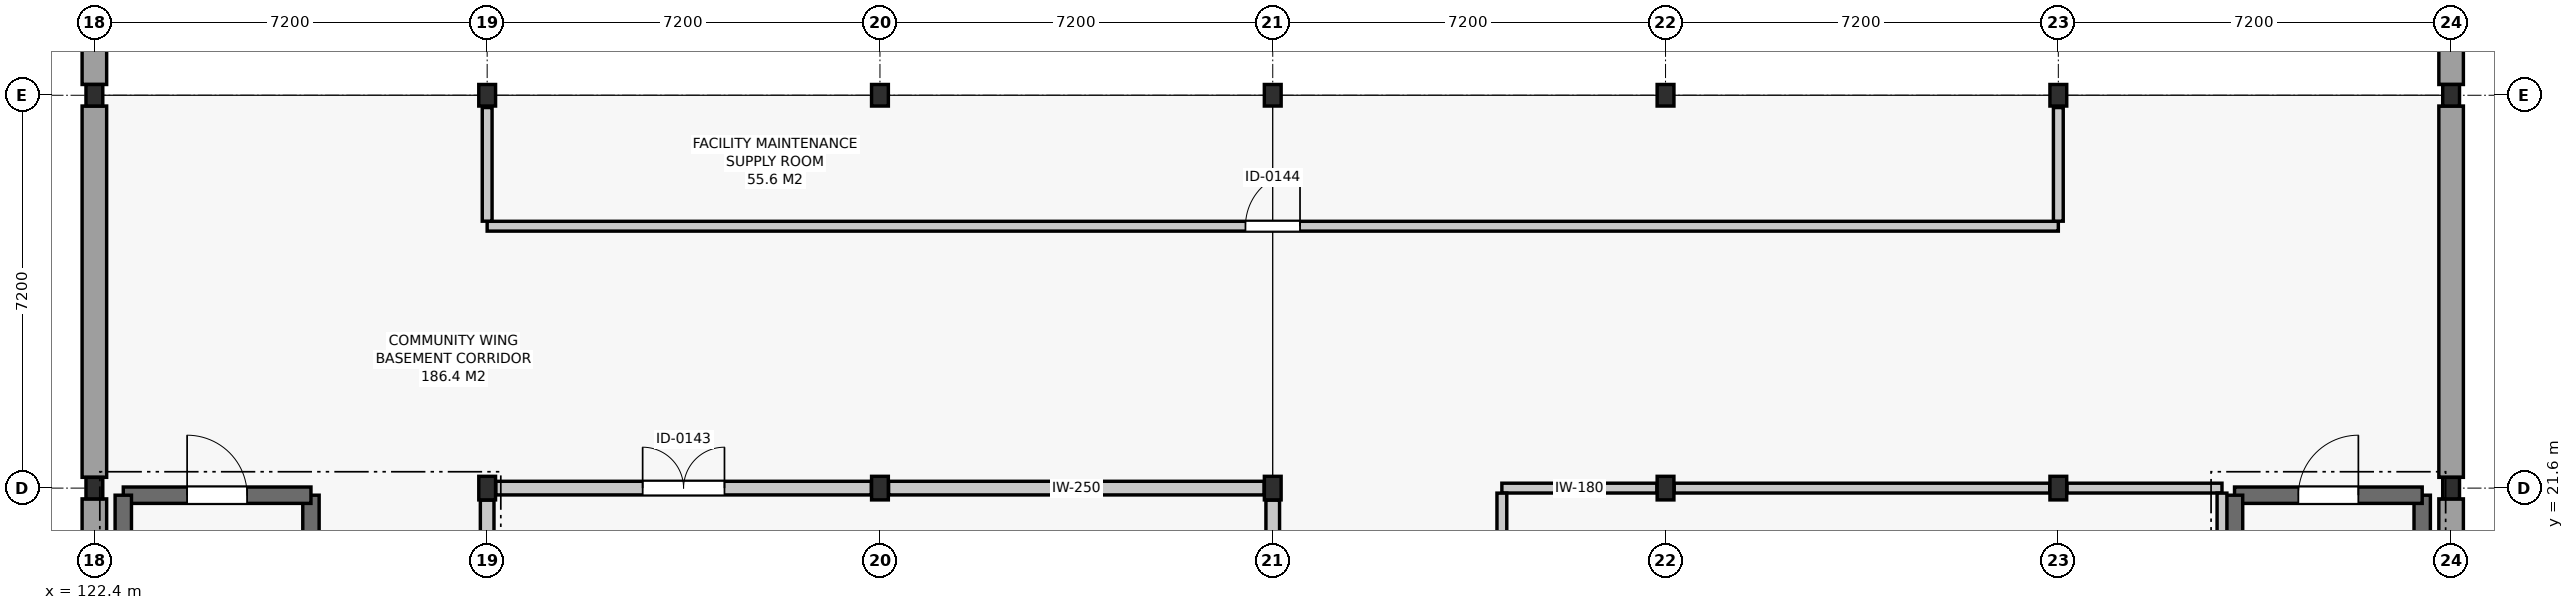
"""IFC4 building model, lengths in metres.
Left out: names, types, materials, properties, quantities, classifications, styles, units other than length and angle.
Written with IfcOpenShell. Run it as: python <this file> out.ifc"""

import sys

from ifc_helpers import new_model, si_unit, direction, frame, frame_2d, origin, origin_2d, place, context, subcontext, project, spatial, rectangle, i_section, extrude, element, fill, save


model = new_model("IFC4")
c1 = context("Model", 3, precision=1e-05, world=origin(), true_north=direction((0.0, 1.0)))
c2 = subcontext(c1, "Body", "Model", "MODEL_VIEW")
j1 = project(units=[si_unit("LENGTHUNIT", "METRE"), si_unit("PLANEANGLEUNIT", "RADIAN")], contexts=[c1])
p1 = place(None, origin())
s1 = spatial("IfcSite", under=j1, at=p1, CompositionType="ELEMENT")
p2 = place(p1, origin())
s2 = spatial("IfcBuilding", under=s1, at=p2, CompositionType="ELEMENT")
p3 = place(p2, frame((0.0, 0.0, -4.2)))
s3 = spatial("IfcBuildingStorey", under=s2, at=p3, CompositionType="ELEMENT", Elevation=-4.2)
for number, where, z_axis, x_axis in (
    (1, (122.4, 21.6, 0.0), (0.0, 0.0, 1.0), (1.0, 0.0, 0.0)),
    (2, (122.4, 28.8, 0.0), (0.0, 0.0, 1.0), (1.0, 0.0, 0.0)),
):
    element("IfcColumn", number, at=place(p3, frame(where, z_axis=z_axis, x_axis=x_axis)), inside=s3, PredefinedType="COLUMN", context=c2, shape_type="SweptSolid", body=[
        extrude(i_section(OverallWidth=0.308, OverallDepth=0.395, WebThickness=0.021, FlangeThickness=0.036, FilletRadius=0.027, at=origin_2d()), origin(), (0.0, 0.0, 1.0), 4.2),
    ])
p4 = place(p3, frame((129.6, 21.6, 0.0), z_axis=(0.0, 0.0, 1.0), x_axis=(1.0, 0.0, 0.0)))
e3 = element("IfcColumn", 3, at=p4, inside=s3, PredefinedType="COLUMN", context=c2, shape_type="SweptSolid", body=[
    extrude(i_section(OverallWidth=0.307, OverallDepth=0.432, WebThickness=0.021, FlangeThickness=0.04, FilletRadius=0.027, at=origin_2d()), origin(), (0.0, 0.0, 1.0), 4.2),
])
p5 = place(p3, frame((129.6, 28.8, 0.0), z_axis=(0.0, 0.0, 1.0), x_axis=(1.0, 0.0, 0.0)))
e4 = element("IfcColumn", 4, at=p5, inside=s3, PredefinedType="COLUMN", context=c2, shape_type="SweptSolid", body=[
    extrude(i_section(OverallWidth=0.308, OverallDepth=0.395, WebThickness=0.021, FlangeThickness=0.036, FilletRadius=0.027, at=origin_2d()), origin(), (0.0, 0.0, 1.0), 4.2),
])
p6 = place(p3, frame((136.8, 21.6, 0.0), z_axis=(0.0, 0.0, 1.0), x_axis=(1.0, 0.0, 0.0)))
e5 = element("IfcColumn", 5, at=p6, inside=s3, PredefinedType="COLUMN", context=c2, shape_type="SweptSolid", body=[
    extrude(i_section(OverallWidth=0.307, OverallDepth=0.432, WebThickness=0.021, FlangeThickness=0.04, FilletRadius=0.027, at=origin_2d()), origin(), (0.0, 0.0, 1.0), 4.2),
])
p7 = place(p3, frame((136.8, 28.8, 0.0), z_axis=(0.0, 0.0, 1.0), x_axis=(1.0, 0.0, 0.0)))
e6 = element("IfcColumn", 6, at=p7, inside=s3, PredefinedType="COLUMN", context=c2, shape_type="SweptSolid", body=[
    extrude(i_section(OverallWidth=0.308, OverallDepth=0.395, WebThickness=0.021, FlangeThickness=0.036, FilletRadius=0.027, at=origin_2d()), origin(), (0.0, 0.0, 1.0), 4.2),
])
p8 = place(p3, frame((144.0, 21.6, 0.0), z_axis=(0.0, 0.0, 1.0), x_axis=(1.0, 0.0, 0.0)))
e7 = element("IfcColumn", 7, at=p8, inside=s3, PredefinedType="COLUMN", context=c2, shape_type="SweptSolid", body=[
    extrude(i_section(OverallWidth=0.307, OverallDepth=0.432, WebThickness=0.021, FlangeThickness=0.04, FilletRadius=0.027, at=origin_2d()), origin(), (0.0, 0.0, 1.0), 4.2),
])
p9 = place(p3, frame((144.0, 28.8, 0.0), z_axis=(0.0, 0.0, 1.0), x_axis=(1.0, 0.0, 0.0)))
e8 = element("IfcColumn", 8, at=p9, inside=s3, PredefinedType="COLUMN", context=c2, shape_type="SweptSolid", body=[
    extrude(i_section(OverallWidth=0.308, OverallDepth=0.395, WebThickness=0.021, FlangeThickness=0.036, FilletRadius=0.027, at=origin_2d()), origin(), (0.0, 0.0, 1.0), 4.2),
])
p10 = place(p3, frame((151.2, 21.6, 0.0), z_axis=(0.0, 0.0, 1.0), x_axis=(1.0, 0.0, 0.0)))
e9 = element("IfcColumn", 9, at=p10, inside=s3, PredefinedType="COLUMN", context=c2, shape_type="SweptSolid", body=[
    extrude(i_section(OverallWidth=0.307, OverallDepth=0.432, WebThickness=0.021, FlangeThickness=0.04, FilletRadius=0.027, at=origin_2d()), origin(), (0.0, 0.0, 1.0), 4.2),
])
p11 = place(p3, frame((151.2, 28.8, 0.0), z_axis=(0.0, 0.0, 1.0), x_axis=(1.0, 0.0, 0.0)))
e10 = element("IfcColumn", 10, at=p11, inside=s3, PredefinedType="COLUMN", context=c2, shape_type="SweptSolid", body=[
    extrude(i_section(OverallWidth=0.308, OverallDepth=0.395, WebThickness=0.021, FlangeThickness=0.036, FilletRadius=0.027, at=origin_2d()), origin(), (0.0, 0.0, 1.0), 4.2),
])
p12 = place(p3, frame((158.4, 21.6, 0.0), z_axis=(0.0, 0.0, 1.0), x_axis=(1.0, 0.0, 0.0)))
e11 = element("IfcColumn", 11, at=p12, inside=s3, PredefinedType="COLUMN", context=c2, shape_type="SweptSolid", body=[
    extrude(i_section(OverallWidth=0.307, OverallDepth=0.432, WebThickness=0.021, FlangeThickness=0.04, FilletRadius=0.027, at=origin_2d()), origin(), (0.0, 0.0, 1.0), 4.2),
])
for number, where, z_axis, x_axis in (
    (12, (158.4, 28.8, 0.0), (0.0, 0.0, 1.0), (1.0, 0.0, 0.0)),
    (13, (165.6, 21.6, 0.0), (0.0, 0.0, 1.0), (1.0, 0.0, 0.0)),
    (14, (165.6, 28.8, 0.0), (0.0, 0.0, 1.0), (1.0, 0.0, 0.0)),
):
    element("IfcColumn", number, at=place(p3, frame(where, z_axis=z_axis, x_axis=x_axis)), inside=s3, PredefinedType="COLUMN", context=c2, shape_type="SweptSolid", body=[
        extrude(i_section(OverallWidth=0.308, OverallDepth=0.395, WebThickness=0.021, FlangeThickness=0.036, FilletRadius=0.027, at=origin_2d()), origin(), (0.0, 0.0, 1.0), 4.2),
    ])
for number, where, z_axis, x_axis in (
    (15, (122.4, 14.597, 0.0), (0.0, 0.0, 1.0), (0.0, 1.0, 0.0)),
    (16, (165.6, 14.597, 0.0), (0.0, 0.0, 1.0), (0.0, 1.0, 0.0)),
):
    element("IfcWall", number, at=place(p3, frame(where, z_axis=z_axis, x_axis=x_axis)), inside=s3, PredefinedType="USERDEFINED", context=c2, shape_type="SweptSolid", body=[
        extrude(rectangle(XDim=6.805, YDim=0.45, at=frame_2d((3.403, 0.0))), origin(), (0.0, 0.0, 1.0), 3.26),
    ])
for number, where, z_axis, x_axis in (
    (17, (122.4, 21.798, 0.0), (0.0, 0.0, 1.0), (0.0, 1.0, 0.0)),
    (18, (165.6, 21.798, 0.0), (0.0, 0.0, 1.0), (0.0, 1.0, 0.0)),
):
    element("IfcWall", number, at=place(p3, frame(where, z_axis=z_axis, x_axis=x_axis)), inside=s3, PredefinedType="USERDEFINED", context=c2, shape_type="SweptSolid", body=[
        extrude(rectangle(XDim=6.805, YDim=0.45, at=frame_2d((3.402, 0.0))), origin(), (0.0, 0.0, 1.0), 3.26),
    ])
for number, where, z_axis, x_axis in (
    (19, (122.4, 28.998, -0.68), (0.0, 0.0, 1.0), (0.0, 1.0, 0.0)),
    (20, (165.6, 28.998, -0.68), (0.0, 0.0, 1.0), (0.0, 1.0, 0.0)),
):
    element("IfcWall", number, at=place(p3, frame(where, z_axis=z_axis, x_axis=x_axis)), inside=s3, PredefinedType="USERDEFINED", context=c2, shape_type="SweptSolid", body=[
        extrude(rectangle(XDim=6.805, YDim=0.45, at=frame_2d((3.402, 0.0))), origin(), (0.0, 0.0, 1.0), 3.94),
    ])
p13 = place(p3, frame((126.37, 14.43, 0.0), z_axis=(0.0, 0.0, 1.0), x_axis=(0.0, 1.0, 0.0)))
e21 = element("IfcWall", 21, at=p13, inside=s3, PredefinedType="SHEAR", context=c2, shape_type="SweptSolid", body=[
    extrude(rectangle(XDim=7.04, YDim=0.3, at=frame_2d((3.52, 0.0))), origin(), (0.0, 0.0, 1.0), 3.88),
])
p14 = place(p3, frame((126.37, 21.47, 0.0), z_axis=(0.0, 0.0, 1.0), x_axis=(-1.0, 0.0, 0.0)))
e22 = element("IfcWall", 22, at=p14, inside=s3, PredefinedType="SHEAR", context=c2, shape_type="SweptSolid", body=[
    extrude(rectangle(XDim=3.44, YDim=0.3, at=frame_2d((1.72, 0.0))), origin(), (0.0, 0.0, 1.0), 3.88),
])
p15 = place(p14, frame((1.17, 0.0, 0.0)))
e23 = element("IfcOpeningElement", 23, at=p15, cuts=e22, PredefinedType="OPENING", context=c2, shape_type="SweptSolid", body=[
    extrude(rectangle(XDim=1.1, YDim=2.15, at=frame_2d((0.55, 1.075))), frame((0.0, 0.162, 0.0), z_axis=(0.0, -1.0, 0.0), x_axis=(1.0, 0.0, 0.0)), (0.0, 0.0, 1.0), 0.324),
])
for number, where, z_axis, x_axis in (
    (24, (122.93, 21.47, 0.0), (0.0, 0.0, 1.0), (0.0, -1.0, 0.0)),
    (25, (165.07, 14.43, 0.0), (0.0, 0.0, 1.0), (0.0, 1.0, 0.0)),
):
    element("IfcWall", number, at=place(p3, frame(where, z_axis=z_axis, x_axis=x_axis)), inside=s3, PredefinedType="SHEAR", context=c2, shape_type="SweptSolid", body=[
        extrude(rectangle(XDim=7.04, YDim=0.3, at=frame_2d((3.52, 0.0))), origin(), (0.0, 0.0, 1.0), 3.88),
    ])
p16 = place(p3, frame((165.07, 21.47, 0.0), z_axis=(0.0, 0.0, 1.0), x_axis=(-1.0, 0.0, 0.0)))
e26 = element("IfcWall", 26, at=p16, inside=s3, PredefinedType="SHEAR", context=c2, shape_type="SweptSolid", body=[
    extrude(rectangle(XDim=3.44, YDim=0.3, at=frame_2d((1.72, 0.0))), origin(), (0.0, 0.0, 1.0), 3.88),
])
p17 = place(p16, frame((1.17, 0.0, 0.0)))
e27 = element("IfcOpeningElement", 27, at=p17, cuts=e26, PredefinedType="OPENING", context=c2, shape_type="SweptSolid", body=[
    extrude(rectangle(XDim=1.1, YDim=2.15, at=frame_2d((0.55, 1.075))), frame((0.0, 0.162, 0.0), z_axis=(0.0, -1.0, 0.0), x_axis=(1.0, 0.0, 0.0)), (0.0, 0.0, 1.0), 0.324),
])
p18 = place(p3, frame((161.63, 21.47, 0.0), z_axis=(0.0, 0.0, 1.0), x_axis=(0.0, -1.0, 0.0)))
e28 = element("IfcWall", 28, at=p18, inside=s3, PredefinedType="SHEAR", context=c2, shape_type="SweptSolid", body=[
    extrude(rectangle(XDim=7.04, YDim=0.3, at=frame_2d((3.52, 0.0))), origin(), (0.0, 0.0, 1.0), 3.88),
])
p19 = place(p3, frame((148.2, 21.6, 0.0), z_axis=(0.0, 0.0, 1.0), x_axis=(1.0, 0.0, 0.0)))
e29 = element("IfcWall", 29, at=p19, inside=s3, PredefinedType="PARTITIONING", context=c2, shape_type="SweptSolid", body=[
    extrude(rectangle(XDim=2.843, YDim=0.18, at=frame_2d((1.421, 0.0))), origin(), (0.0, 0.0, 1.0), 3.465),
])
p20 = place(p3, frame((151.357, 21.6, 0.0), z_axis=(0.0, 0.0, 1.0), x_axis=(1.0, 0.0, 0.0)))
e30 = element("IfcWall", 30, at=p20, inside=s3, PredefinedType="PARTITIONING", context=c2, shape_type="SweptSolid", body=[
    extrude(rectangle(XDim=6.885, YDim=0.18, at=frame_2d((3.442, 0.0))), origin(), (0.0, 0.0, 1.0), 3.465),
])
p21 = place(p3, frame((158.558, 21.6, 0.0), z_axis=(0.0, 0.0, 1.0), x_axis=(1.0, 0.0, 0.0)))
e31 = element("IfcWall", 31, at=p21, inside=s3, PredefinedType="PARTITIONING", context=c2, shape_type="SweptSolid", body=[
    extrude(rectangle(XDim=2.842, YDim=0.18, at=frame_2d((1.421, 0.0))), origin(), (0.0, 0.0, 1.0), 3.465),
])
p22 = place(p3, frame((129.758, 21.6, 0.0), z_axis=(0.0, 0.0, 1.0), x_axis=(1.0, 0.0, 0.0)))
e32 = element("IfcWall", 32, at=p22, inside=s3, PredefinedType="SOLIDWALL", context=c2, shape_type="SweptSolid", body=[
    extrude(rectangle(XDim=6.885, YDim=0.25, at=frame_2d((3.442, 0.0))), origin(), (0.0, 0.0, 1.0), 3.465),
])
p23 = place(p22, frame((2.692, 0.0, 0.0)))
e33 = element("IfcOpeningElement", 33, at=p23, cuts=e32, PredefinedType="OPENING", context=c2, shape_type="SweptSolid", body=[
    extrude(rectangle(XDim=1.5, YDim=2.2, at=frame_2d((0.75, 1.1))), frame((0.0, 0.137, 0.0), z_axis=(0.0, -1.0, 0.0), x_axis=(1.0, 0.0, 0.0)), (0.0, 0.0, 1.0), 0.274),
])
p24 = place(p3, frame((136.958, 21.6, 0.0), z_axis=(0.0, 0.0, 1.0), x_axis=(1.0, 0.0, 0.0)))
e34 = element("IfcWall", 34, at=p24, inside=s3, PredefinedType="SOLIDWALL", context=c2, shape_type="SweptSolid", body=[
    extrude(rectangle(XDim=6.885, YDim=0.25, at=frame_2d((3.442, 0.0))), origin(), (0.0, 0.0, 1.0), 3.465),
])
p25 = place(p3, frame((129.6, 26.4, 0.0), z_axis=(0.0, 0.0, 1.0), x_axis=(1.0, 0.0, 0.0)))
e35 = element("IfcWall", 35, at=p25, inside=s3, PredefinedType="PARTITIONING", context=c2, shape_type="SweptSolid", body=[
    extrude(rectangle(XDim=28.8, YDim=0.18, at=frame_2d((14.4, 0.0))), origin(), (0.0, 0.0, 1.0), 3.315),
])
p26 = place(p25, frame((13.9, 0.0, 0.0)))
e36 = element("IfcOpeningElement", 36, at=p26, cuts=e35, PredefinedType="OPENING", context=c2, shape_type="SweptSolid", body=[
    extrude(rectangle(XDim=1.0, YDim=2.15, at=frame_2d((0.5, 1.075))), frame((0.0, 0.102, 0.0), z_axis=(0.0, -1.0, 0.0), x_axis=(1.0, 0.0, 0.0)), (0.0, 0.0, 1.0), 0.204),
])
p27 = place(p3, frame((148.2, 7.425, 0.0), z_axis=(0.0, 0.0, 1.0), x_axis=(0.0, 1.0, 0.0)))
e37 = element("IfcWall", 37, at=p27, inside=s3, PredefinedType="PARTITIONING", context=c2, shape_type="SweptSolid", body=[
    extrude(rectangle(XDim=14.083, YDim=0.18, at=frame_2d((7.042, 0.0))), origin(), (0.0, 0.0, 1.0), 3.465),
])
p28 = place(p27, frame((6.542, 0.0, 0.0)))
e38 = element("IfcOpeningElement", 38, at=p28, cuts=e37, PredefinedType="OPENING", context=c2, shape_type="SweptSolid", body=[
    extrude(rectangle(XDim=1.0, YDim=2.15, at=frame_2d((0.5, 1.075))), frame((0.0, 0.102, 0.0), z_axis=(0.0, -1.0, 0.0), x_axis=(1.0, 0.0, 0.0)), (0.0, 0.0, 1.0), 0.204),
])
p29 = place(p3, frame((161.4, 7.425, 0.0), z_axis=(0.0, 0.0, 1.0), x_axis=(0.0, 1.0, 0.0)))
e39 = element("IfcWall", 39, at=p29, inside=s3, PredefinedType="PARTITIONING", context=c2, shape_type="SweptSolid", body=[
    extrude(rectangle(XDim=14.083, YDim=0.18, at=frame_2d((7.042, 0.0))), origin(), (0.0, 0.0, 1.0), 3.465),
])
for number, where, z_axis, x_axis in (
    (40, (129.6, 14.62, 0.0), (0.0, 0.0, 1.0), (0.0, 1.0, 0.0)),
    (41, (144.0, 14.62, 0.0), (0.0, 0.0, 1.0), (0.0, 1.0, 0.0)),
):
    element("IfcWall", number, at=place(p3, frame(where, z_axis=z_axis, x_axis=x_axis)), inside=s3, PredefinedType="SOLIDWALL", context=c2, shape_type="SweptSolid", body=[
        extrude(rectangle(XDim=6.76, YDim=0.25, at=frame_2d((3.38, 0.0))), origin(), (0.0, 0.0, 1.0), 3.425),
    ])
for number, where, z_axis, x_axis in (
    (42, (129.6, 26.492, 0.0), (0.0, 0.0, 1.0), (0.0, 1.0, 0.0)),
    (43, (158.4, 26.492, 0.0), (0.0, 0.0, 1.0), (0.0, 1.0, 0.0)),
):
    element("IfcWall", number, at=place(p3, frame(where, z_axis=z_axis, x_axis=x_axis)), inside=s3, PredefinedType="PARTITIONING", context=c2, shape_type="SweptSolid", body=[
        extrude(rectangle(XDim=2.083, YDim=0.18, at=frame_2d((1.042, 0.0))), origin(), (0.0, 0.0, 1.0), 3.425),
    ])
p30 = place(p15, frame((1.1, 0.0, 0.0), z_axis=(0.0, 0.0, 1.0), x_axis=(-1.0, 0.0, 0.0)))
e44 = element("IfcDoor", 44, at=p30, inside=s3, OperationType="SINGLE_SWING_LEFT", PredefinedType="DOOR", context=c2, shape_type="SweptSolid", body=[
    extrude(rectangle(XDim=1.1, YDim=2.15, at=frame_2d((0.55, 1.075))), frame((0.0, 0.025, 0.0), z_axis=(0.0, -1.0, 0.0), x_axis=(1.0, 0.0, 0.0)), (0.0, 0.0, 1.0), 0.05),
])
fill(e23, e44)
p31 = place(p17, frame((1.1, 0.0, 0.0), z_axis=(0.0, 0.0, 1.0), x_axis=(-1.0, 0.0, 0.0)))
e45 = element("IfcDoor", 45, at=p31, inside=s3, OperationType="SINGLE_SWING_RIGHT", PredefinedType="DOOR", context=c2, shape_type="SweptSolid", body=[
    extrude(rectangle(XDim=1.1, YDim=2.15, at=frame_2d((0.55, 1.075))), frame((0.0, 0.025, 0.0), z_axis=(0.0, -1.0, 0.0), x_axis=(1.0, 0.0, 0.0)), (0.0, 0.0, 1.0), 0.05),
])
fill(e27, e45)
p32 = place(p23, origin())
e46 = element("IfcDoor", 46, at=p32, inside=s3, OperationType="DOUBLE_DOOR_SINGLE_SWING", PredefinedType="DOOR", context=c2, shape_type="SweptSolid", body=[
    extrude(rectangle(XDim=1.5, YDim=2.2, at=frame_2d((0.75, 1.1))), frame((0.0, 0.025, 0.0), z_axis=(0.0, -1.0, 0.0), x_axis=(1.0, 0.0, 0.0)), (0.0, 0.0, 1.0), 0.05),
])
fill(e33, e46)
p33 = place(p26, origin())
e47 = element("IfcDoor", 47, at=p33, inside=s3, OperationType="SINGLE_SWING_RIGHT", PredefinedType="DOOR", context=c2, shape_type="SweptSolid", body=[
    extrude(rectangle(XDim=1.0, YDim=2.15, at=frame_2d((0.5, 1.075))), frame((0.0, 0.025, 0.0), z_axis=(0.0, -1.0, 0.0), x_axis=(1.0, 0.0, 0.0)), (0.0, 0.0, 1.0), 0.05),
])
fill(e36, e47)
save(model, sys.argv[1])
